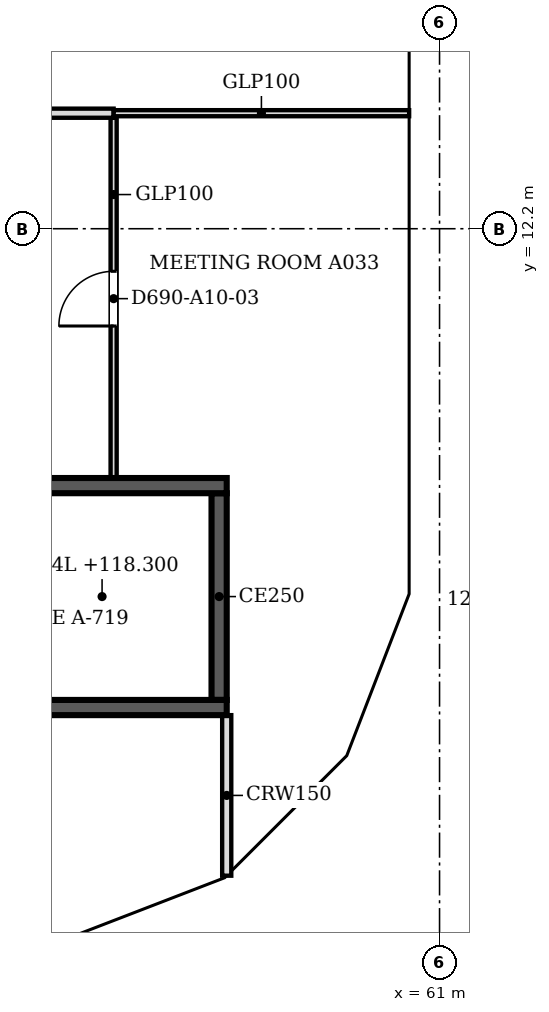
"""IFC4 building model, lengths in metres.
Left out: names, types, materials, properties, quantities, classifications, styles, units other than length and angle.
Written with IfcOpenShell. Run it as: python <this file> out.ifc"""

import sys

from ifc_helpers import new_model, si_unit, direction, frame, frame_2d, origin, place, context, subcontext, project, spatial, polyline, rectangle, outline, extrude, faceted_brep, source, transform, mapped, element, fill, save


model = new_model("IFC4")
c1 = context("Model", 3, precision=1e-05, world=origin(), true_north=direction((0.0, 1.0)))
c2 = subcontext(c1, "Body", "Model", "MODEL_VIEW")
j1 = project(units=[si_unit("LENGTHUNIT", "METRE"), si_unit("PLANEANGLEUNIT", "RADIAN")], contexts=[c1])
p1 = place(None, origin())
s1 = spatial("IfcSite", under=j1, at=p1, CompositionType="ELEMENT")
p2 = place(p1, origin())
s2 = spatial("IfcBuilding", under=s1, at=p2, CompositionType="ELEMENT")
p3 = place(p2, frame((0.0, 0.0, 116.4)))
s3 = spatial("IfcBuildingStorey", under=s2, at=p3, CompositionType="ELEMENT", Elevation=116.4)
m1 = source(origin(), c2, "Body", "Brep", [
    faceted_brep([(2.95, -0.25, 0.0), (3.003, -0.25, 0.068), (3.003, -0.25, 7.531), (2.95, -0.25, 7.6), (0.0, -0.25, 3.8), (0.047, 0.25, 3.86), (2.898, 0.25, 7.532), (2.898, 0.25, 0.068), (0.047, 0.25, 3.74), (2.95, 0.0, 0.0), (2.95, 0.0, 7.6), (0.0, 0.0, 3.8)], [[[0, 1, 2, 3, 4]], [[5, 6, 7, 8]], [[1, 0, 9]], [[10, 3, 2]], [[6, 5, 11, 4, 3, 10]], [[8, 7, 9, 0, 4, 11]], [[8, 11, 5]], [[1, 9, 7, 6, 10, 2]]]),
])
p4 = place(p3, frame((54.854, 0.25, -3.8), z_axis=(0.0, 0.0, 1.0), x_axis=(0.932970071518, 0.359953949349, 0.0)))
e1 = element("IfcWall", 1, at=p4, inside=s3, PredefinedType="SOLIDWALL", context=c2, shape_type="MappedRepresentation", body=[
    mapped(m1, transform((0.0, 0.0, 0.0), scale=1.0)),
])
m2 = source(origin(), c2, "Body", "SweptSolid", [
    extrude(outline(polyline([(2.75, 6.935), (0.316, 3.8), (2.75, 0.665), (2.75, 6.935)])), frame((0.0, 0.26, 0.0), z_axis=(0.0, -1.0, 0.0), x_axis=(1.0, 0.0, 0.0)), (0.0, 0.0, 1.0), 0.52),
])
p5 = place(p4, origin())
e2 = element("IfcOpeningElement", 2, at=p5, cuts=e1, PredefinedType="OPENING", context=c2, shape_type="MappedRepresentation", body=[
    mapped(m2, transform((0.0, 0.0, 0.0), scale=1.0)),
])
m3 = source(origin(), c2, "Body", "Brep", [
    faceted_brep([(0.053, -0.25, 0.0), (2.997, -0.25, 3.8), (0.053, -0.25, 7.6), (0.0, -0.25, 7.532), (0.0, -0.25, 0.068), (0.106, 0.25, 7.531), (2.944, 0.25, 3.868), (2.944, 0.25, 3.732), (0.106, 0.25, 0.068), (2.997, 0.0, 3.8), (0.053, 0.0, 0.0), (0.053, 0.0, 7.6)], [[[0, 1, 2, 3, 4]], [[5, 6, 7, 8]], [[8, 7, 9, 1, 0, 10]], [[6, 5, 11, 2, 1, 9]], [[3, 2, 11]], [[10, 0, 4]], [[8, 10, 4, 3, 11, 5]], [[9, 7, 6]]]),
])
p6 = place(p3, frame((57.569, 1.274, -3.8), z_axis=(0.0, 0.0, 1.0), x_axis=(0.707066050402, 0.707147509625, 0.0)))
e3 = element("IfcWall", 3, at=p6, inside=s3, PredefinedType="SOLIDWALL", context=c2, shape_type="MappedRepresentation", body=[
    mapped(m3, transform((0.0, 0.0, 0.0), scale=1.0)),
])
m4 = source(origin(), c2, "Body", "SweptSolid", [
    extrude(outline(polyline([(0.253, 0.666), (2.681, 3.8), (0.253, 6.934), (0.253, 0.666)])), frame((0.0, 0.26, 0.0), z_axis=(0.0, -1.0, 0.0), x_axis=(1.0, 0.0, 0.0)), (0.0, 0.0, 1.0), 0.52),
])
p7 = place(p6, origin())
e4 = element("IfcOpeningElement", 4, at=p7, cuts=e3, PredefinedType="OPENING", context=c2, shape_type="MappedRepresentation", body=[
    mapped(m4, transform((0.0, 0.0, 0.0), scale=1.0)),
])
m5 = source(origin(), c2, "Body", "Brep", [
    faceted_brep([(2.95, -0.25, 0.0), (2.997, -0.25, 0.059), (2.997, -0.25, 7.541), (2.95, -0.25, 7.6), (0.0, -0.25, 3.8), (0.053, 0.25, 3.868), (2.904, 0.25, 7.54), (2.904, 0.25, 0.06), (0.053, 0.25, 3.732), (2.95, 0.0, 0.0), (2.95, 0.0, 7.6), (0.0, 0.0, 3.8)], [[[0, 1, 2, 3, 4]], [[5, 6, 7, 8]], [[1, 0, 9]], [[10, 3, 2]], [[6, 5, 11, 4, 3, 10]], [[8, 7, 9, 0, 4, 11]], [[8, 11, 5]], [[1, 9, 7, 6, 10, 2]]]),
])
p8 = place(p3, frame((59.688, 3.394, -3.8), z_axis=(0.0, 0.0, 1.0), x_axis=(0.359972353723, 0.932962970624, 0.0)))
e5 = element("IfcWall", 5, at=p8, inside=s3, PredefinedType="SOLIDWALL", context=c2, shape_type="MappedRepresentation", body=[
    mapped(m5, transform((0.0, 0.0, 0.0), scale=1.0)),
])
p9 = place(p8, origin())
e6 = element("IfcOpeningElement", 6, at=p9, cuts=e5, PredefinedType="OPENING", context=c2, shape_type="MappedRepresentation", body=[
    mapped(m2, transform((0.0, 0.0, 0.0), scale=1.0)),
])
m6 = source(origin(), c2, "Body", "Brep", [
    faceted_brep([(0.047, -0.25, 0.0), (3.05, -0.25, 3.8), (0.047, -0.25, 7.6), (0.0, -0.25, 7.54), (0.0, -0.25, 0.06), (0.093, 0.25, 7.541), (3.05, 0.25, 3.8), (0.093, 0.25, 0.059), (0.047, 0.0, 0.0), (0.047, 0.0, 7.6)], [[[0, 1, 2, 3, 4]], [[5, 6, 7]], [[7, 6, 1, 0, 8]], [[6, 5, 9, 2, 1]], [[3, 2, 9]], [[8, 0, 4]], [[7, 8, 4, 3, 9, 5]]]),
])
p10 = place(p3, frame((60.75, 6.1, -3.8), z_axis=(0.0, 0.0, 1.0), x_axis=(0.0, 1.0, 0.0)))
e7 = element("IfcWall", 7, at=p10, inside=s3, PredefinedType="SOLIDWALL", context=c2, shape_type="MappedRepresentation", body=[
    mapped(m6, transform((0.0, 0.0, 0.0), scale=1.0)),
])
m7 = source(origin(), c2, "Body", "SweptSolid", [
    extrude(outline(polyline([(0.247, 0.656), (2.731, 3.8), (0.247, 6.944), (0.247, 0.656)])), frame((0.0, 0.26, 0.0), z_axis=(0.0, -1.0, 0.0), x_axis=(1.0, 0.0, 0.0)), (0.0, 0.0, 1.0), 0.52),
])
p11 = place(p10, origin())
e8 = element("IfcOpeningElement", 8, at=p11, cuts=e7, PredefinedType="OPENING", context=c2, shape_type="MappedRepresentation", body=[
    mapped(m7, transform((0.0, 0.0, 0.0), scale=1.0)),
])
m8 = source(origin(), c2, "Body", "SweptSolid", [
    extrude(outline(polyline([(3.05, 0.0), (6.1, 3.8), (3.05, 7.6), (0.0, 3.8), (3.05, 0.0)])), frame((0.0, 0.25, 0.0), z_axis=(0.0, -1.0, 0.0), x_axis=(1.0, 0.0, 0.0)), (0.0, 0.0, 1.0), 0.5),
])
p12 = place(p3, frame((60.75, 9.15, -3.8), z_axis=(0.0, 0.0, 1.0), x_axis=(0.0, 1.0, 0.0)))
e9 = element("IfcWall", 9, at=p12, inside=s3, PredefinedType="SOLIDWALL", context=c2, shape_type="MappedRepresentation", body=[
    mapped(m8, transform((0.0, 0.0, 0.0), scale=1.0)),
])
m9 = source(origin(), c2, "Body", "SweptSolid", [
    extrude(outline(polyline([(3.05, 0.399), (5.78, 3.8), (3.05, 7.2), (0.321, 3.8), (3.05, 0.399)])), frame((0.0, 0.26, 0.0), z_axis=(0.0, -1.0, 0.0), x_axis=(1.0, 0.0, 0.0)), (0.0, 0.0, 1.0), 0.52),
])
p13 = place(p12, origin())
e10 = element("IfcOpeningElement", 10, at=p13, cuts=e9, PredefinedType="OPENING", context=c2, shape_type="MappedRepresentation", body=[
    mapped(m9, transform((0.0, 0.0, 0.0), scale=1.0)),
])
p14 = place(p2, frame((0.0, 0.0, 120.2)))
s4 = spatial("IfcBuildingStorey", under=s2, at=p14, CompositionType="ELEMENT", Elevation=120.2)
m10 = source(origin(), c2, "Body", "Brep", [
    faceted_brep([(0.047, -0.25, 0.0), (2.997, -0.25, 3.8), (0.047, -0.25, 7.6), (0.0, -0.25, 7.541), (0.0, -0.25, 0.059), (0.093, 0.25, 7.54), (2.944, 0.25, 3.868), (2.944, 0.25, 3.732), (0.093, 0.25, 0.06), (2.997, 0.0, 3.8), (0.047, 0.0, 0.0), (0.047, 0.0, 7.6)], [[[0, 1, 2, 3, 4]], [[5, 6, 7, 8]], [[8, 7, 9, 1, 0, 10]], [[6, 5, 11, 2, 1, 9]], [[3, 2, 11]], [[10, 0, 4]], [[8, 10, 4, 3, 11, 5]], [[9, 7, 6]]]),
])
p15 = place(p14, frame((54.81, 0.233, -3.8), z_axis=(0.0, 0.0, 1.0), x_axis=(0.932990326376, 0.359901446078, 0.0)))
e11 = element("IfcWall", 11, at=p15, inside=s4, PredefinedType="SOLIDWALL", context=c2, shape_type="MappedRepresentation", body=[
    mapped(m10, transform((0.0, 0.0, 0.0), scale=1.0)),
])
m11 = source(origin(), c2, "Body", "SweptSolid", [
    extrude(outline(polyline([(0.247, 0.665), (2.681, 3.8), (0.247, 6.935), (0.247, 0.665)])), frame((0.0, 0.26, 0.0), z_axis=(0.0, -1.0, 0.0), x_axis=(1.0, 0.0, 0.0)), (0.0, 0.0, 1.0), 0.52),
])
p16 = place(p15, origin())
e12 = element("IfcOpeningElement", 12, at=p16, cuts=e11, PredefinedType="OPENING", context=c2, shape_type="MappedRepresentation", body=[
    mapped(m11, transform((0.0, 0.0, 0.0), scale=1.0)),
])
m12 = source(origin(), c2, "Body", "Brep", [
    faceted_brep([(2.944, -0.25, 0.0), (2.997, -0.25, 0.068), (2.997, -0.25, 7.532), (2.944, -0.25, 7.6), (0.0, -0.25, 3.8), (0.053, 0.25, 3.868), (2.891, 0.25, 7.532), (2.891, 0.25, 0.068), (0.053, 0.25, 3.732), (2.944, 0.0, 0.0), (2.944, 0.0, 7.6), (0.0, 0.0, 3.8)], [[[0, 1, 2, 3, 4]], [[5, 6, 7, 8]], [[1, 0, 9]], [[10, 3, 2]], [[6, 5, 11, 4, 3, 10]], [[8, 7, 9, 0, 4, 11]], [[8, 11, 5]], [[1, 9, 7, 6, 10, 2]]]),
])
p17 = place(p14, frame((57.606, 1.312, -3.8), z_axis=(0.0, 0.0, 1.0), x_axis=(0.707147509625, 0.707066050402, 0.0)))
e13 = element("IfcWall", 13, at=p17, inside=s4, PredefinedType="SOLIDWALL", context=c2, shape_type="MappedRepresentation", body=[
    mapped(m12, transform((0.0, 0.0, 0.0), scale=1.0)),
])
m13 = source(origin(), c2, "Body", "SweptSolid", [
    extrude(outline(polyline([(2.744, 6.934), (0.316, 3.8), (2.744, 0.667), (2.744, 6.934)])), frame((0.0, 0.26, 0.0), z_axis=(0.0, -1.0, 0.0), x_axis=(1.0, 0.0, 0.0)), (0.0, 0.0, 1.0), 0.52),
])
p18 = place(p17, origin())
e14 = element("IfcOpeningElement", 14, at=p18, cuts=e13, PredefinedType="OPENING", context=c2, shape_type="MappedRepresentation", body=[
    mapped(m13, transform((0.0, 0.0, 0.0), scale=1.0)),
])
m14 = source(origin(), c2, "Body", "Brep", [
    faceted_brep([(0.053, -0.25, 0.0), (3.003, -0.25, 3.8), (0.053, -0.25, 7.6), (0.0, -0.25, 7.532), (0.0, -0.25, 0.068), (0.106, 0.25, 7.532), (2.957, 0.25, 3.86), (2.957, 0.25, 3.74), (0.106, 0.25, 0.068), (3.003, 0.0, 3.8), (0.053, 0.0, 0.0), (0.053, 0.0, 7.6)], [[[0, 1, 2, 3, 4]], [[5, 6, 7, 8]], [[8, 7, 9, 1, 0, 10]], [[6, 5, 11, 2, 1, 9]], [[3, 2, 11]], [[10, 0, 4]], [[8, 10, 4, 3, 11, 5]], [[9, 7, 6]]]),
])
p19 = place(p14, frame((59.669, 3.344, -3.8), z_axis=(0.0, 0.0, 1.0), x_axis=(0.35992665181, 0.932980602862, 0.0)))
e15 = element("IfcWall", 15, at=p19, inside=s4, PredefinedType="SOLIDWALL", context=c2, shape_type="MappedRepresentation", body=[
    mapped(m14, transform((0.0, 0.0, 0.0), scale=1.0)),
])
m15 = source(origin(), c2, "Body", "SweptSolid", [
    extrude(outline(polyline([(0.253, 0.665), (2.687, 3.8), (0.253, 6.935), (0.253, 0.665)])), frame((0.0, 0.26, 0.0), z_axis=(0.0, -1.0, 0.0), x_axis=(1.0, 0.0, 0.0)), (0.0, 0.0, 1.0), 0.52),
])
p20 = place(p19, origin())
e16 = element("IfcOpeningElement", 16, at=p20, cuts=e15, PredefinedType="OPENING", context=c2, shape_type="MappedRepresentation", body=[
    mapped(m15, transform((0.0, 0.0, 0.0), scale=1.0)),
])
m16 = source(origin(), c2, "Body", "Brep", [
    faceted_brep([(3.003, -0.25, 0.0), (6.053, -0.25, 3.8), (3.003, -0.25, 7.6), (0.0, -0.25, 3.8), (0.047, 0.25, 3.859), (3.003, 0.25, 7.6), (6.053, 0.25, 3.8), (3.003, 0.25, 0.0), (0.047, 0.25, 3.741), (0.0, 0.0, 3.8)], [[[0, 1, 2, 3]], [[4, 5, 6, 7, 8]], [[7, 6, 1, 0]], [[6, 5, 2, 1]], [[5, 4, 9, 3, 2]], [[8, 7, 0, 3, 9]], [[8, 9, 4]]]),
])
p21 = place(p14, frame((60.75, 6.146, -3.8), z_axis=(0.0, 0.0, 1.0), x_axis=(0.0, 1.0, 0.0)))
e17 = element("IfcWall", 17, at=p21, inside=s4, PredefinedType="SOLIDWALL", context=c2, shape_type="MappedRepresentation", body=[
    mapped(m16, transform((0.0, 0.0, 0.0), scale=1.0)),
])
m17 = source(origin(), c2, "Body", "SweptSolid", [
    extrude(outline(polyline([(3.005, 0.401), (5.733, 3.8), (3.005, 7.199), (0.319, 3.8), (3.005, 0.401)])), frame((0.0, 0.26, 0.0), z_axis=(0.0, -1.0, 0.0), x_axis=(1.0, 0.0, 0.0)), (0.0, 0.0, 1.0), 0.52),
])
p22 = place(p21, origin())
e18 = element("IfcOpeningElement", 18, at=p22, cuts=e17, PredefinedType="OPENING", context=c2, shape_type="MappedRepresentation", body=[
    mapped(m17, transform((0.0, 0.0, 0.0), scale=1.0)),
])
m18 = source(origin(), c2, "Body", "SweptSolid", [
    extrude(outline(polyline([(3.05, 0.0), (6.1, 3.8), (3.05, 7.6), (0.0, 3.8), (3.05, 0.0)])), frame((0.0, 0.25, 0.0), z_axis=(0.0, -1.0, 0.0), x_axis=(1.0, 0.0, 0.0)), (0.0, 0.0, 1.0), 0.5),
])
p23 = place(p14, frame((60.75, 12.2, -3.8), z_axis=(0.0, 0.0, 1.0), x_axis=(0.0, 1.0, 0.0)))
e19 = element("IfcWall", 19, at=p23, inside=s4, PredefinedType="SOLIDWALL", context=c2, shape_type="MappedRepresentation", body=[
    mapped(m18, transform((0.0, 0.0, 0.0), scale=1.0)),
])
m19 = source(origin(), c2, "Body", "SweptSolid", [
    extrude(outline(polyline([(3.05, 0.399), (5.78, 3.8), (3.05, 7.201), (0.321, 3.8), (3.05, 0.399)])), frame((0.0, 0.26, 0.0), z_axis=(0.0, -1.0, 0.0), x_axis=(1.0, 0.0, 0.0)), (0.0, 0.0, 1.0), 0.52),
])
p24 = place(p23, origin())
e20 = element("IfcOpeningElement", 20, at=p24, cuts=e19, PredefinedType="OPENING", context=c2, shape_type="MappedRepresentation", body=[
    mapped(m19, transform((0.0, 0.0, 0.0), scale=1.0)),
])
p25 = place(p3, frame((57.5, 4.325, 0.0), z_axis=(0.0, 0.0, 1.0), x_axis=(-1.0, 0.0, 0.0)))
e21 = element("IfcWall", 21, at=p25, inside=s3, PredefinedType="SOLIDWALL", context=c2, shape_type="SweptSolid", body=[
    extrude(rectangle(XDim=8.5, YDim=0.25, at=frame_2d((4.25, 0.0))), origin(), (0.0, 0.0, 1.0), 3.8),
])
m20 = source(origin(), c2, "Body", "SweptSolid", [
    extrude(rectangle(XDim=1.2, YDim=2.1, at=frame_2d((0.6, 1.05))), frame((0.0, 0.135, 0.0), z_axis=(0.0, -1.0, 0.0), x_axis=(1.0, 0.0, 0.0)), (0.0, 0.0, 1.0), 0.27),
])
p26 = place(p25, frame((6.9, 0.0, 0.0)))
e22 = element("IfcOpeningElement", 22, at=p26, cuts=e21, PredefinedType="OPENING", context=c2, shape_type="MappedRepresentation", body=[
    mapped(m20, transform((0.0, 0.0, 0.0), scale=1.0)),
])
p27 = place(p3, frame((49.0, 7.975, 0.0), z_axis=(0.0, 0.0, 1.0), x_axis=(1.0, 0.0, 0.0)))
e23 = element("IfcWall", 23, at=p27, inside=s3, PredefinedType="SOLIDWALL", context=c2, shape_type="SweptSolid", body=[
    extrude(rectangle(XDim=8.5, YDim=0.25, at=frame_2d((4.25, 0.0))), origin(), (0.0, 0.0, 1.0), 3.8),
])
p28 = place(p3, frame((57.375, 7.85, 0.0), z_axis=(0.0, 0.0, 1.0), x_axis=(0.0, -1.0, 0.0)))
e24 = element("IfcWall", 24, at=p28, inside=s3, PredefinedType="SOLIDWALL", context=c2, shape_type="SweptSolid", body=[
    extrude(rectangle(XDim=3.4, YDim=0.25, at=frame_2d((1.7, 0.0))), origin(), (0.0, 0.0, 1.0), 3.8),
])
p29 = place(p3, frame((57.5, 1.559, 0.0), z_axis=(0.0, 0.0, 1.0), x_axis=(0.0, 1.0, 0.0)))
e25 = element("IfcWall", 25, at=p29, inside=s3, PredefinedType="PARTITIONING", context=c2, shape_type="SweptSolid", body=[
    extrude(rectangle(XDim=2.641, YDim=0.15, at=frame_2d((1.32, 0.0))), origin(), (0.0, 0.0, 1.0), 3.067),
])
p30 = place(p3, frame((55.64, 14.024, 0.0), z_axis=(0.0, 0.0, 1.0), x_axis=(0.0, -1.0, 0.0)))
e26 = element("IfcWall", 26, at=p30, inside=s3, PredefinedType="PARTITIONING", context=c2, shape_type="SweptSolid", body=[
    extrude(rectangle(XDim=5.924, YDim=0.1, at=frame_2d((2.962, 0.0))), origin(), (0.0, 0.0, 1.0), 3.067),
])
m21 = source(origin(), c2, "Body", "SweptSolid", [
    extrude(rectangle(XDim=0.9, YDim=2.1, at=frame_2d((0.45, 1.05))), frame((0.0, 0.06, 0.0), z_axis=(0.0, -1.0, 0.0), x_axis=(1.0, 0.0, 0.0)), (0.0, 0.0, 1.0), 0.12),
])
p31 = place(p30, frame((2.524, 0.0, 0.0)))
e27 = element("IfcOpeningElement", 27, at=p31, cuts=e26, PredefinedType="OPENING", context=c2, shape_type="MappedRepresentation", body=[
    mapped(m21, transform((0.0, 0.0, 0.0), scale=1.0)),
])
p32 = place(p3, frame((46.476, 14.1, 0.0), z_axis=(0.0, 0.0, 1.0), x_axis=(1.0, 0.0, 0.0)))
e28 = element("IfcWall", 28, at=p32, inside=s3, PredefinedType="PARTITIONING", context=c2, shape_type="SweptSolid", body=[
    extrude(rectangle(XDim=9.164, YDim=0.15, at=frame_2d((4.582, 0.0))), origin(), (0.0, 0.0, 1.0), 3.067),
])
p33 = place(p3, frame((55.641, 14.1, 0.0), z_axis=(0.0, 0.0, 1.0), x_axis=(1.0, 0.0, 0.0)))
e29 = element("IfcWall", 29, at=p33, inside=s3, PredefinedType="PARTITIONING", context=c2, shape_type="SweptSolid", body=[
    extrude(rectangle(XDim=4.859, YDim=0.1, at=frame_2d((2.429, 0.0))), origin(), (0.0, 0.0, 1.0), 3.067),
])
m22 = source(origin(), c2, "Body", "SweptSolid", [
    extrude(rectangle(XDim=0.9, YDim=2.1, at=frame_2d((0.45, 1.05))), frame((0.0, 0.025, 0.0), z_axis=(0.0, -1.0, 0.0), x_axis=(1.0, 0.0, 0.0)), (0.0, 0.0, 1.0), 0.05),
])
p34 = place(p31, origin())
e30 = element("IfcDoor", 30, at=p34, inside=s3, OperationType="SINGLE_SWING_RIGHT", PredefinedType="DOOR", context=c2, shape_type="MappedRepresentation", body=[
    mapped(m22, transform((0.0, 0.0, 0.0), scale=1.0)),
])
fill(e27, e30)
save(model, sys.argv[1])
